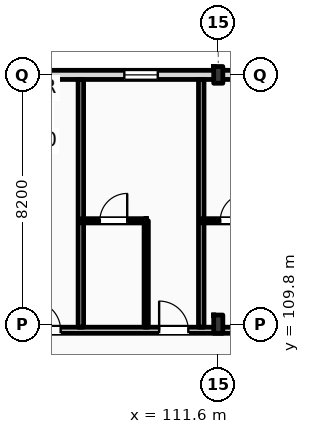
"""IFC4 building model, lengths in metres.
Left out: names, types, materials, properties, quantities, classifications, styles, units other than length and angle.
Written with IfcOpenShell. Run it as: python <this file> out.ifc"""

import sys

from ifc_helpers import new_model, si_unit, direction, frame, frame_2d, origin, origin_2d, place, context, subcontext, project, spatial, rectangle, i_section, extrude, element, fill, save


model = new_model("IFC4")
c1 = context("Model", 3, precision=1e-05, world=origin(), true_north=direction((0.0, 1.0)))
c2 = subcontext(c1, "Body", "Model", "MODEL_VIEW")
j1 = project(units=[si_unit("LENGTHUNIT", "METRE"), si_unit("PLANEANGLEUNIT", "RADIAN")], contexts=[c1])
p1 = place(None, origin())
s1 = spatial("IfcSite", under=j1, at=p1, CompositionType="ELEMENT")
p2 = place(p1, origin())
s2 = spatial("IfcBuilding", under=s1, at=p2, CompositionType="ELEMENT")
p3 = place(p2, frame((0.0, 0.0, 20.4)))
s3 = spatial("IfcBuildingStorey", under=s2, at=p3, CompositionType="ELEMENT", Elevation=20.4)
p4 = place(p3, frame((111.6, 109.8, 0.0), z_axis=(0.0, 0.0, 1.0), x_axis=(1.0, 0.0, 0.0)))
e1 = element("IfcColumn", 1, at=p4, inside=s3, PredefinedType="COLUMN", context=c2, shape_type="SweptSolid", body=[
    extrude(i_section(OverallWidth=0.3, OverallDepth=0.6, WebThickness=0.015, FlangeThickness=0.03, FilletRadius=0.027, at=origin_2d()), origin(), (0.0, 0.0, 1.0), 4.2),
])
p5 = place(p3, frame((111.6, 118.0, 0.0), z_axis=(0.0, 0.0, 1.0), x_axis=(1.0, 0.0, 0.0)))
e2 = element("IfcColumn", 2, at=p5, inside=s3, PredefinedType="COLUMN", context=c2, shape_type="SweptSolid", body=[
    extrude(i_section(OverallWidth=0.3, OverallDepth=0.55, WebThickness=0.015, FlangeThickness=0.029, FilletRadius=0.027, at=origin_2d()), origin(), (0.0, 0.0, 1.0), 4.2),
])
p6 = place(p3, frame((22.5, 118.0, 0.0), z_axis=(0.0, 0.0, 1.0), x_axis=(1.0, 0.0, 0.0)))
e3 = element("IfcWall", 3, at=p6, inside=s3, PredefinedType="STANDARD", context=c2, shape_type="SweptSolid", body=[
    extrude(rectangle(XDim=97.5, YDim=0.3, at=frame_2d((48.75, 0.0))), origin(), (0.0, 0.0, 1.0), 3.38),
])
p7 = place(p6, frame((0.91, 0.0, 0.9)))
e4 = element("IfcOpeningElement", 4, at=p7, cuts=e3, PredefinedType="OPENING", context=c2, shape_type="SweptSolid", body=[
    extrude(rectangle(XDim=0.9, YDim=1.8, at=frame_2d((0.45, 0.9))), frame((0.0, 0.16, 0.0), z_axis=(0.0, -1.0, 0.0), x_axis=(1.0, 0.0, 0.0)), (0.0, 0.0, 1.0), 0.32),
])
p8 = place(p6, frame((6.36, 0.0, 0.0)))
e5 = element("IfcOpeningElement", 5, at=p8, cuts=e3, PredefinedType="OPENING", context=c2, shape_type="SweptSolid", body=[
    extrude(rectangle(XDim=1.2, YDim=2.25, at=frame_2d((0.6, 1.125))), frame((0.0, 0.16, 0.0), z_axis=(0.0, -1.0, 0.0), x_axis=(1.0, 0.0, 0.0)), (0.0, 0.0, 1.0), 0.32),
])
p9 = place(p6, frame((11.41, 0.0, 0.9)))
e6 = element("IfcOpeningElement", 6, at=p9, cuts=e3, PredefinedType="OPENING", context=c2, shape_type="SweptSolid", body=[
    extrude(rectangle(XDim=1.1, YDim=1.9, at=frame_2d((0.55, 0.95))), frame((0.0, 0.16, 0.0), z_axis=(0.0, -1.0, 0.0), x_axis=(1.0, 0.0, 0.0)), (0.0, 0.0, 1.0), 0.32),
])
p10 = place(p6, frame((14.335, 0.0, 0.9)))
e7 = element("IfcOpeningElement", 7, at=p10, cuts=e3, PredefinedType="OPENING", context=c2, shape_type="SweptSolid", body=[
    extrude(rectangle(XDim=1.65, YDim=1.95, at=frame_2d((0.825, 0.975))), frame((0.0, 0.16, 0.0), z_axis=(0.0, -1.0, 0.0), x_axis=(1.0, 0.0, 0.0)), (0.0, 0.0, 1.0), 0.32),
])
p11 = place(p6, frame((19.26, 0.0, 0.9)))
e8 = element("IfcOpeningElement", 8, at=p11, cuts=e3, PredefinedType="OPENING", context=c2, shape_type="SweptSolid", body=[
    extrude(rectangle(XDim=1.35, YDim=2.0, at=frame_2d((0.675, 1.0))), frame((0.0, 0.16, 0.0), z_axis=(0.0, -1.0, 0.0), x_axis=(1.0, 0.0, 0.0)), (0.0, 0.0, 1.0), 0.32),
])
p12 = place(p6, frame((22.8, 0.0, 0.0)))
e9 = element("IfcOpeningElement", 9, at=p12, cuts=e3, PredefinedType="OPENING", context=c2, shape_type="SweptSolid", body=[
    extrude(rectangle(XDim=1.2, YDim=2.25, at=frame_2d((0.6, 1.125))), frame((0.0, 0.16, 0.0), z_axis=(0.0, -1.0, 0.0), x_axis=(1.0, 0.0, 0.0)), (0.0, 0.0, 1.0), 0.32),
])
p13 = place(p6, frame((26.91, 0.0, 0.9)))
e10 = element("IfcOpeningElement", 10, at=p13, cuts=e3, PredefinedType="OPENING", context=c2, shape_type="SweptSolid", body=[
    extrude(rectangle(XDim=2.1, YDim=2.1, at=frame_2d((1.05, 1.05))), frame((0.0, 0.16, 0.0), z_axis=(0.0, -1.0, 0.0), x_axis=(1.0, 0.0, 0.0)), (0.0, 0.0, 1.0), 0.32),
])
p14 = place(p6, frame((30.835, 0.0, 0.9)))
e11 = element("IfcOpeningElement", 11, at=p14, cuts=e3, PredefinedType="OPENING", context=c2, shape_type="SweptSolid", body=[
    extrude(rectangle(XDim=2.25, YDim=2.15, at=frame_2d((1.125, 1.075))), frame((0.0, 0.16, 0.0), z_axis=(0.0, -1.0, 0.0), x_axis=(1.0, 0.0, 0.0)), (0.0, 0.0, 1.0), 0.32),
])
p15 = place(p6, frame((34.96, 0.0, 0.9)))
e12 = element("IfcOpeningElement", 12, at=p15, cuts=e3, PredefinedType="OPENING", context=c2, shape_type="SweptSolid", body=[
    extrude(rectangle(XDim=2.4, YDim=2.2, at=frame_2d((1.2, 1.1))), frame((0.0, 0.16, 0.0), z_axis=(0.0, -1.0, 0.0), x_axis=(1.0, 0.0, 0.0)), (0.0, 0.0, 1.0), 0.32),
])
p16 = place(p6, frame((39.0, 0.0, 0.0)))
e13 = element("IfcOpeningElement", 13, at=p16, cuts=e3, PredefinedType="OPENING", context=c2, shape_type="SweptSolid", body=[
    extrude(rectangle(XDim=1.2, YDim=2.25, at=frame_2d((0.6, 1.125))), frame((0.0, 0.16, 0.0), z_axis=(0.0, -1.0, 0.0), x_axis=(1.0, 0.0, 0.0)), (0.0, 0.0, 1.0), 0.32),
])
p17 = place(p6, frame((43.21, 0.0, 0.9)))
e14 = element("IfcOpeningElement", 14, at=p17, cuts=e3, PredefinedType="OPENING", context=c2, shape_type="SweptSolid", body=[
    extrude(rectangle(XDim=2.7, YDim=2.3, at=frame_2d((1.35, 1.15))), frame((0.0, 0.16, 0.0), z_axis=(0.0, -1.0, 0.0), x_axis=(1.0, 0.0, 0.0)), (0.0, 0.0, 1.0), 0.32),
])
p18 = place(p6, frame((47.335, 0.0, 0.9)))
e15 = element("IfcOpeningElement", 15, at=p18, cuts=e3, PredefinedType="OPENING", context=c2, shape_type="SweptSolid", body=[
    extrude(rectangle(XDim=1.35, YDim=2.3, at=frame_2d((0.675, 1.15))), frame((0.0, 0.16, 0.0), z_axis=(0.0, -1.0, 0.0), x_axis=(1.0, 0.0, 0.0)), (0.0, 0.0, 1.0), 0.32),
])
p19 = place(p6, frame((52.74, 0.0, 0.0)))
e16 = element("IfcOpeningElement", 16, at=p19, cuts=e3, PredefinedType="OPENING", context=c2, shape_type="SweptSolid", body=[
    extrude(rectangle(XDim=1.2, YDim=2.25, at=frame_2d((0.6, 1.125))), frame((0.0, 0.16, 0.0), z_axis=(0.0, -1.0, 0.0), x_axis=(1.0, 0.0, 0.0)), (0.0, 0.0, 1.0), 0.32),
])
p20 = place(p6, frame((55.36, 0.0, 0.9)))
e17 = element("IfcOpeningElement", 17, at=p20, cuts=e3, PredefinedType="OPENING", context=c2, shape_type="SweptSolid", body=[
    extrude(rectangle(XDim=1.1, YDim=2.3, at=frame_2d((0.55, 1.15))), frame((0.0, 0.16, 0.0), z_axis=(0.0, -1.0, 0.0), x_axis=(1.0, 0.0, 0.0)), (0.0, 0.0, 1.0), 0.32),
])
p21 = place(p6, frame((59.99, 0.0, 0.9)))
e18 = element("IfcOpeningElement", 18, at=p21, cuts=e3, PredefinedType="OPENING", context=c2, shape_type="SweptSolid", body=[
    extrude(rectangle(XDim=2.74, YDim=2.3, at=frame_2d((1.37, 1.15))), frame((0.0, 0.16, 0.0), z_axis=(0.0, -1.0, 0.0), x_axis=(1.0, 0.0, 0.0)), (0.0, 0.0, 1.0), 0.32),
])
p22 = place(p6, frame((65.95, 0.0, 0.9)))
e19 = element("IfcOpeningElement", 19, at=p22, cuts=e3, PredefinedType="OPENING", context=c2, shape_type="SweptSolid", body=[
    extrude(rectangle(XDim=1.35, YDim=2.3, at=frame_2d((0.675, 1.15))), frame((0.0, 0.16, 0.0), z_axis=(0.0, -1.0, 0.0), x_axis=(1.0, 0.0, 0.0)), (0.0, 0.0, 1.0), 0.32),
])
p23 = place(p6, frame((69.16, 0.0, 0.0)))
e20 = element("IfcOpeningElement", 20, at=p23, cuts=e3, PredefinedType="OPENING", context=c2, shape_type="SweptSolid", body=[
    extrude(rectangle(XDim=1.2, YDim=2.25, at=frame_2d((0.6, 1.125))), frame((0.0, 0.16, 0.0), z_axis=(0.0, -1.0, 0.0), x_axis=(1.0, 0.0, 0.0)), (0.0, 0.0, 1.0), 0.32),
])
p24 = place(p6, frame((73.75, 0.0, 0.9)))
e21 = element("IfcOpeningElement", 21, at=p24, cuts=e3, PredefinedType="OPENING", context=c2, shape_type="SweptSolid", body=[
    extrude(rectangle(XDim=1.8, YDim=2.3, at=frame_2d((0.9, 1.15))), frame((0.0, 0.16, 0.0), z_axis=(0.0, -1.0, 0.0), x_axis=(1.0, 0.0, 0.0)), (0.0, 0.0, 1.0), 0.32),
])
p25 = place(p6, frame((76.79, 0.0, 0.9)))
e22 = element("IfcOpeningElement", 22, at=p25, cuts=e3, PredefinedType="OPENING", context=c2, shape_type="SweptSolid", body=[
    extrude(rectangle(XDim=2.74, YDim=2.3, at=frame_2d((1.37, 1.15))), frame((0.0, 0.16, 0.0), z_axis=(0.0, -1.0, 0.0), x_axis=(1.0, 0.0, 0.0)), (0.0, 0.0, 1.0), 0.32),
])
p26 = place(p6, frame((81.55, 0.0, 0.9)))
e23 = element("IfcOpeningElement", 23, at=p26, cuts=e3, PredefinedType="OPENING", context=c2, shape_type="SweptSolid", body=[
    extrude(rectangle(XDim=1.8, YDim=2.3, at=frame_2d((0.9, 1.15))), frame((0.0, 0.16, 0.0), z_axis=(0.0, -1.0, 0.0), x_axis=(1.0, 0.0, 0.0)), (0.0, 0.0, 1.0), 0.32),
])
p27 = place(p6, frame((86.01, 0.0, 0.9)))
e24 = element("IfcOpeningElement", 24, at=p27, cuts=e3, PredefinedType="OPENING", context=c2, shape_type="SweptSolid", body=[
    extrude(rectangle(XDim=1.1, YDim=1.5, at=frame_2d((0.55, 0.75))), frame((0.0, 0.16, 0.0), z_axis=(0.0, -1.0, 0.0), x_axis=(1.0, 0.0, 0.0)), (0.0, 0.0, 1.0), 0.32),
])
p28 = place(p6, frame((90.135, 0.0, 0.9)))
e25 = element("IfcOpeningElement", 25, at=p28, cuts=e3, PredefinedType="OPENING", context=c2, shape_type="SweptSolid", body=[
    extrude(rectangle(XDim=1.25, YDim=1.6, at=frame_2d((0.625, 0.8))), frame((0.0, 0.16, 0.0), z_axis=(0.0, -1.0, 0.0), x_axis=(1.0, 0.0, 0.0)), (0.0, 0.0, 1.0), 0.32),
])
p29 = place(p6, frame((94.34, 0.0, 0.9)))
e26 = element("IfcOpeningElement", 26, at=p29, cuts=e3, PredefinedType="OPENING", context=c2, shape_type="SweptSolid", body=[
    extrude(rectangle(XDim=1.4, YDim=1.7, at=frame_2d((0.7, 0.85))), frame((0.0, 0.16, 0.0), z_axis=(0.0, -1.0, 0.0), x_axis=(1.0, 0.0, 0.0)), (0.0, 0.0, 1.0), 0.32),
])
p30 = place(p3, frame((10.65, 109.6, 0.0), z_axis=(0.0, 0.0, 1.0), x_axis=(1.0, 0.0, 0.0)))
e27 = element("IfcWall", 27, at=p30, inside=s3, PredefinedType="PARTITIONING", context=c2, shape_type="SweptSolid", body=[
    extrude(rectangle(XDim=109.21, YDim=0.2, at=frame_2d((54.605, 0.0))), origin(), (0.0, 0.0, 1.0), 3.38),
])
p31 = place(p30, frame((12.535, 0.0, 0.0)))
e28 = element("IfcOpeningElement", 28, at=p31, cuts=e27, PredefinedType="OPENING", context=c2, shape_type="SweptSolid", body=[
    extrude(rectangle(XDim=1.02, YDim=2.2, at=frame_2d((0.51, 1.1))), frame((0.0, 0.11, 0.0), z_axis=(0.0, -1.0, 0.0), x_axis=(1.0, 0.0, 0.0)), (0.0, 0.0, 1.0), 0.22),
])
p32 = place(p30, frame((19.175, 0.0, 0.0)))
e29 = element("IfcOpeningElement", 29, at=p32, cuts=e27, PredefinedType="OPENING", context=c2, shape_type="SweptSolid", body=[
    extrude(rectangle(XDim=1.02, YDim=2.2, at=frame_2d((0.51, 1.1))), frame((0.0, 0.11, 0.0), z_axis=(0.0, -1.0, 0.0), x_axis=(1.0, 0.0, 0.0)), (0.0, 0.0, 1.0), 0.22),
])
p33 = place(p30, frame((23.375, 0.0, 0.0)))
e30 = element("IfcOpeningElement", 30, at=p33, cuts=e27, PredefinedType="OPENING", context=c2, shape_type="SweptSolid", body=[
    extrude(rectangle(XDim=1.02, YDim=2.2, at=frame_2d((0.51, 1.1))), frame((0.0, 0.11, 0.0), z_axis=(0.0, -1.0, 0.0), x_axis=(1.0, 0.0, 0.0)), (0.0, 0.0, 1.0), 0.22),
])
p34 = place(p30, frame((27.575, 0.0, 0.0)))
e31 = element("IfcOpeningElement", 31, at=p34, cuts=e27, PredefinedType="OPENING", context=c2, shape_type="SweptSolid", body=[
    extrude(rectangle(XDim=1.02, YDim=2.2, at=frame_2d((0.51, 1.1))), frame((0.0, 0.11, 0.0), z_axis=(0.0, -1.0, 0.0), x_axis=(1.0, 0.0, 0.0)), (0.0, 0.0, 1.0), 0.22),
])
p35 = place(p30, frame((31.805, 0.0, 0.0)))
e32 = element("IfcOpeningElement", 32, at=p35, cuts=e27, PredefinedType="OPENING", context=c2, shape_type="SweptSolid", body=[
    extrude(rectangle(XDim=0.96, YDim=2.2, at=frame_2d((0.48, 1.1))), frame((0.0, 0.11, 0.0), z_axis=(0.0, -1.0, 0.0), x_axis=(1.0, 0.0, 0.0)), (0.0, 0.0, 1.0), 0.22),
])
p36 = place(p30, frame((33.855, 0.0, 0.0)))
e33 = element("IfcOpeningElement", 33, at=p36, cuts=e27, PredefinedType="OPENING", context=c2, shape_type="SweptSolid", body=[
    extrude(rectangle(XDim=0.96, YDim=2.2, at=frame_2d((0.48, 1.1))), frame((0.0, 0.11, 0.0), z_axis=(0.0, -1.0, 0.0), x_axis=(1.0, 0.0, 0.0)), (0.0, 0.0, 1.0), 0.22),
])
p37 = place(p30, frame((40.205, 0.0, 0.0)))
e34 = element("IfcOpeningElement", 34, at=p37, cuts=e27, PredefinedType="OPENING", context=c2, shape_type="SweptSolid", body=[
    extrude(rectangle(XDim=0.96, YDim=2.2, at=frame_2d((0.48, 1.1))), frame((0.0, 0.11, 0.0), z_axis=(0.0, -1.0, 0.0), x_axis=(1.0, 0.0, 0.0)), (0.0, 0.0, 1.0), 0.22),
])
p38 = place(p30, frame((42.255, 0.0, 0.0)))
e35 = element("IfcOpeningElement", 35, at=p38, cuts=e27, PredefinedType="OPENING", context=c2, shape_type="SweptSolid", body=[
    extrude(rectangle(XDim=0.96, YDim=2.2, at=frame_2d((0.48, 1.1))), frame((0.0, 0.11, 0.0), z_axis=(0.0, -1.0, 0.0), x_axis=(1.0, 0.0, 0.0)), (0.0, 0.0, 1.0), 0.22),
])
p39 = place(p30, frame((48.605, 0.0, 0.0)))
e36 = element("IfcOpeningElement", 36, at=p39, cuts=e27, PredefinedType="OPENING", context=c2, shape_type="SweptSolid", body=[
    extrude(rectangle(XDim=0.96, YDim=2.2, at=frame_2d((0.48, 1.1))), frame((0.0, 0.11, 0.0), z_axis=(0.0, -1.0, 0.0), x_axis=(1.0, 0.0, 0.0)), (0.0, 0.0, 1.0), 0.22),
])
p40 = place(p30, frame((50.655, 0.0, 0.0)))
e37 = element("IfcOpeningElement", 37, at=p40, cuts=e27, PredefinedType="OPENING", context=c2, shape_type="SweptSolid", body=[
    extrude(rectangle(XDim=0.96, YDim=2.2, at=frame_2d((0.48, 1.1))), frame((0.0, 0.11, 0.0), z_axis=(0.0, -1.0, 0.0), x_axis=(1.0, 0.0, 0.0)), (0.0, 0.0, 1.0), 0.22),
])
p41 = place(p30, frame((57.005, 0.0, 0.0)))
e38 = element("IfcOpeningElement", 38, at=p41, cuts=e27, PredefinedType="OPENING", context=c2, shape_type="SweptSolid", body=[
    extrude(rectangle(XDim=0.96, YDim=2.2, at=frame_2d((0.48, 1.1))), frame((0.0, 0.11, 0.0), z_axis=(0.0, -1.0, 0.0), x_axis=(1.0, 0.0, 0.0)), (0.0, 0.0, 1.0), 0.22),
])
p42 = place(p30, frame((59.055, 0.0, 0.0)))
e39 = element("IfcOpeningElement", 39, at=p42, cuts=e27, PredefinedType="OPENING", context=c2, shape_type="SweptSolid", body=[
    extrude(rectangle(XDim=0.96, YDim=2.2, at=frame_2d((0.48, 1.1))), frame((0.0, 0.11, 0.0), z_axis=(0.0, -1.0, 0.0), x_axis=(1.0, 0.0, 0.0)), (0.0, 0.0, 1.0), 0.22),
])
p43 = place(p30, frame((65.405, 0.0, 0.0)))
e40 = element("IfcOpeningElement", 40, at=p43, cuts=e27, PredefinedType="OPENING", context=c2, shape_type="SweptSolid", body=[
    extrude(rectangle(XDim=0.96, YDim=2.2, at=frame_2d((0.48, 1.1))), frame((0.0, 0.11, 0.0), z_axis=(0.0, -1.0, 0.0), x_axis=(1.0, 0.0, 0.0)), (0.0, 0.0, 1.0), 0.22),
])
p44 = place(p30, frame((67.205, 0.0, 0.0)))
e41 = element("IfcOpeningElement", 41, at=p44, cuts=e27, PredefinedType="OPENING", context=c2, shape_type="SweptSolid", body=[
    extrude(rectangle(XDim=0.96, YDim=2.2, at=frame_2d((0.48, 1.1))), frame((0.0, 0.11, 0.0), z_axis=(0.0, -1.0, 0.0), x_axis=(1.0, 0.0, 0.0)), (0.0, 0.0, 1.0), 0.22),
])
p45 = place(p30, frame((73.805, 0.0, 0.0)))
e42 = element("IfcOpeningElement", 42, at=p45, cuts=e27, PredefinedType="OPENING", context=c2, shape_type="SweptSolid", body=[
    extrude(rectangle(XDim=0.96, YDim=2.2, at=frame_2d((0.48, 1.1))), frame((0.0, 0.11, 0.0), z_axis=(0.0, -1.0, 0.0), x_axis=(1.0, 0.0, 0.0)), (0.0, 0.0, 1.0), 0.22),
])
p46 = place(p30, frame((78.255, 0.0, 0.0)))
e43 = element("IfcOpeningElement", 43, at=p46, cuts=e27, PredefinedType="OPENING", context=c2, shape_type="SweptSolid", body=[
    extrude(rectangle(XDim=0.96, YDim=2.2, at=frame_2d((0.48, 1.1))), frame((0.0, 0.11, 0.0), z_axis=(0.0, -1.0, 0.0), x_axis=(1.0, 0.0, 0.0)), (0.0, 0.0, 1.0), 0.22),
])
p47 = place(p30, frame((82.205, 0.0, 0.0)))
e44 = element("IfcOpeningElement", 44, at=p47, cuts=e27, PredefinedType="OPENING", context=c2, shape_type="SweptSolid", body=[
    extrude(rectangle(XDim=0.96, YDim=2.2, at=frame_2d((0.48, 1.1))), frame((0.0, 0.11, 0.0), z_axis=(0.0, -1.0, 0.0), x_axis=(1.0, 0.0, 0.0)), (0.0, 0.0, 1.0), 0.22),
])
p48 = place(p30, frame((86.405, 0.0, 0.0)))
e45 = element("IfcOpeningElement", 45, at=p48, cuts=e27, PredefinedType="OPENING", context=c2, shape_type="SweptSolid", body=[
    extrude(rectangle(XDim=0.96, YDim=2.2, at=frame_2d((0.48, 1.1))), frame((0.0, 0.11, 0.0), z_axis=(0.0, -1.0, 0.0), x_axis=(1.0, 0.0, 0.0)), (0.0, 0.0, 1.0), 0.22),
])
p49 = place(p30, frame((90.605, 0.0, 0.0)))
e46 = element("IfcOpeningElement", 46, at=p49, cuts=e27, PredefinedType="OPENING", context=c2, shape_type="SweptSolid", body=[
    extrude(rectangle(XDim=0.96, YDim=2.2, at=frame_2d((0.48, 1.1))), frame((0.0, 0.11, 0.0), z_axis=(0.0, -1.0, 0.0), x_axis=(1.0, 0.0, 0.0)), (0.0, 0.0, 1.0), 0.22),
])
p50 = place(p30, frame((94.805, 0.0, 0.0)))
e47 = element("IfcOpeningElement", 47, at=p50, cuts=e27, PredefinedType="OPENING", context=c2, shape_type="SweptSolid", body=[
    extrude(rectangle(XDim=0.96, YDim=2.2, at=frame_2d((0.48, 1.1))), frame((0.0, 0.11, 0.0), z_axis=(0.0, -1.0, 0.0), x_axis=(1.0, 0.0, 0.0)), (0.0, 0.0, 1.0), 0.22),
])
p51 = place(p30, frame((99.005, 0.0, 0.0)))
e48 = element("IfcOpeningElement", 48, at=p51, cuts=e27, PredefinedType="OPENING", context=c2, shape_type="SweptSolid", body=[
    extrude(rectangle(XDim=0.96, YDim=2.2, at=frame_2d((0.48, 1.1))), frame((0.0, 0.11, 0.0), z_axis=(0.0, -1.0, 0.0), x_axis=(1.0, 0.0, 0.0)), (0.0, 0.0, 1.0), 0.22),
])
p52 = place(p30, frame((103.205, 0.0, 0.0)))
e49 = element("IfcOpeningElement", 49, at=p52, cuts=e27, PredefinedType="OPENING", context=c2, shape_type="SweptSolid", body=[
    extrude(rectangle(XDim=0.96, YDim=2.2, at=frame_2d((0.48, 1.1))), frame((0.0, 0.11, 0.0), z_axis=(0.0, -1.0, 0.0), x_axis=(1.0, 0.0, 0.0)), (0.0, 0.0, 1.0), 0.22),
])
p53 = place(p30, frame((105.335, 0.0, 0.0)))
e50 = element("IfcOpeningElement", 50, at=p53, cuts=e27, PredefinedType="OPENING", context=c2, shape_type="SweptSolid", body=[
    extrude(rectangle(XDim=0.96, YDim=2.2, at=frame_2d((0.48, 1.1))), frame((0.0, 0.11, 0.0), z_axis=(0.0, -1.0, 0.0), x_axis=(1.0, 0.0, 0.0)), (0.0, 0.0, 1.0), 0.22),
])
p54 = place(p30, frame((2.716, 0.0, 0.0)))
e51 = element("IfcOpeningElement", 51, at=p54, cuts=e27, PredefinedType="OPENING", context=c2, shape_type="SweptSolid", body=[
    extrude(rectangle(XDim=1.35, YDim=2.25, at=frame_2d((0.675, 1.125))), frame((0.0, 0.11, 0.0), z_axis=(0.0, -1.0, 0.0), x_axis=(1.0, 0.0, 0.0)), (0.0, 0.0, 1.0), 0.22),
])
p55 = place(p30, frame((6.65, 0.0, 0.0)))
e52 = element("IfcOpeningElement", 52, at=p55, cuts=e27, PredefinedType="OPENING", context=c2, shape_type="SweptSolid", body=[
    extrude(rectangle(XDim=1.35, YDim=2.25, at=frame_2d((0.675, 1.125))), frame((0.0, 0.11, 0.0), z_axis=(0.0, -1.0, 0.0), x_axis=(1.0, 0.0, 0.0)), (0.0, 0.0, 1.0), 0.22),
])
p56 = place(p30, frame((10.583, 0.0, 0.0)))
e53 = element("IfcOpeningElement", 53, at=p56, cuts=e27, PredefinedType="OPENING", context=c2, shape_type="SweptSolid", body=[
    extrude(rectangle(XDim=1.35, YDim=2.25, at=frame_2d((0.675, 1.125))), frame((0.0, 0.11, 0.0), z_axis=(0.0, -1.0, 0.0), x_axis=(1.0, 0.0, 0.0)), (0.0, 0.0, 1.0), 0.22),
])
for number, where, z_axis, x_axis in (
    (54, (107.08, 109.7, 0.0), (0.0, 0.0, 1.0), (0.0, 1.0, 0.0)),
    (55, (111.04, 109.7, 0.0), (0.0, 0.0, 1.0), (0.0, 1.0, 0.0)),
):
    element("IfcWall", number, at=place(p3, frame(where, z_axis=z_axis, x_axis=x_axis)), inside=s3, PredefinedType="PARTITIONING", context=c2, shape_type="SweptSolid", body=[
        extrude(rectangle(XDim=8.15, YDim=0.18, at=frame_2d((4.075, 0.0))), origin(), (0.0, 0.0, 1.0), 3.94),
    ])
p57 = place(p3, frame((109.23, 109.7, 0.0), z_axis=(0.0, 0.0, 1.0), x_axis=(0.0, 1.0, 0.0)))
e56 = element("IfcWall", 56, at=p57, inside=s3, PredefinedType="PARTITIONING", context=c2, shape_type="SweptSolid", body=[
    extrude(rectangle(XDim=3.5, YDim=0.14, at=frame_2d((1.75, 0.0))), origin(), (0.0, 0.0, 1.0), 3.94),
])
p58 = place(p3, frame((107.08, 113.2, 0.0), z_axis=(0.0, 0.0, 1.0), x_axis=(1.0, 0.0, 0.0)))
e57 = element("IfcWall", 57, at=p58, inside=s3, PredefinedType="PARTITIONING", context=c2, shape_type="SweptSolid", body=[
    extrude(rectangle(XDim=2.15, YDim=0.14, at=frame_2d((1.075, 0.0))), origin(), (0.0, 0.0, 1.0), 3.94),
])
p59 = place(p58, frame((0.625, 0.0, 0.0)))
e58 = element("IfcOpeningElement", 58, at=p59, cuts=e57, PredefinedType="OPENING", context=c2, shape_type="SweptSolid", body=[
    extrude(rectangle(XDim=0.9, YDim=2.1, at=frame_2d((0.45, 1.05))), frame((0.0, 0.08, 0.0), z_axis=(0.0, -1.0, 0.0), x_axis=(1.0, 0.0, 0.0)), (0.0, 0.0, 1.0), 0.16),
])
p60 = place(p3, frame((111.04, 113.2, 0.0), z_axis=(0.0, 0.0, 1.0), x_axis=(1.0, 0.0, 0.0)))
e59 = element("IfcWall", 59, at=p60, inside=s3, PredefinedType="PARTITIONING", context=c2, shape_type="SweptSolid", body=[
    extrude(rectangle(XDim=2.15, YDim=0.14, at=frame_2d((1.075, 0.0))), origin(), (0.0, 0.0, 1.0), 3.94),
])
p61 = place(p60, frame((0.625, 0.0, 0.0)))
e60 = element("IfcOpeningElement", 60, at=p61, cuts=e59, PredefinedType="OPENING", context=c2, shape_type="SweptSolid", body=[
    extrude(rectangle(XDim=0.9, YDim=2.1, at=frame_2d((0.45, 1.05))), frame((0.0, 0.08, 0.0), z_axis=(0.0, -1.0, 0.0), x_axis=(1.0, 0.0, 0.0)), (0.0, 0.0, 1.0), 0.16),
])
p62 = place(p27, origin())
e61 = element("IfcWindow", 61, at=p62, inside=s3, PartitioningType="DOUBLE_PANEL_VERTICAL", PredefinedType="WINDOW", context=c2, shape_type="SweptSolid", body=[
    extrude(rectangle(XDim=1.1, YDim=1.5, at=frame_2d((0.55, 0.75))), frame((0.0, 0.03, 0.0), z_axis=(0.0, -1.0, 0.0), x_axis=(1.0, 0.0, 0.0)), (0.0, 0.0, 1.0), 0.06),
])
fill(e24, e61)
p63 = place(p50, origin())
e62 = element("IfcDoor", 62, at=p63, inside=s3, OperationType="SINGLE_SWING_LEFT", PredefinedType="DOOR", context=c2, shape_type="SweptSolid", body=[
    extrude(rectangle(XDim=0.96, YDim=2.2, at=frame_2d((0.48, 1.1))), frame((0.0, 0.025, 0.0), z_axis=(0.0, -1.0, 0.0), x_axis=(1.0, 0.0, 0.0)), (0.0, 0.0, 1.0), 0.05),
])
fill(e47, e62)
p64 = place(p51, origin())
e63 = element("IfcDoor", 63, at=p64, inside=s3, OperationType="SINGLE_SWING_LEFT", PredefinedType="DOOR", context=c2, shape_type="SweptSolid", body=[
    extrude(rectangle(XDim=0.96, YDim=2.2, at=frame_2d((0.48, 1.1))), frame((0.0, 0.025, 0.0), z_axis=(0.0, -1.0, 0.0), x_axis=(1.0, 0.0, 0.0)), (0.0, 0.0, 1.0), 0.05),
])
fill(e48, e63)
p65 = place(p59, origin())
e64 = element("IfcDoor", 64, at=p65, inside=s3, OperationType="SINGLE_SWING_RIGHT", PredefinedType="DOOR", context=c2, shape_type="SweptSolid", body=[
    extrude(rectangle(XDim=0.9, YDim=2.1, at=frame_2d((0.45, 1.05))), frame((0.0, 0.025, 0.0), z_axis=(0.0, -1.0, 0.0), x_axis=(1.0, 0.0, 0.0)), (0.0, 0.0, 1.0), 0.05),
])
fill(e58, e64)
p66 = place(p61, origin())
e65 = element("IfcDoor", 65, at=p66, inside=s3, OperationType="SINGLE_SWING_RIGHT", PredefinedType="DOOR", context=c2, shape_type="SweptSolid", body=[
    extrude(rectangle(XDim=0.9, YDim=2.1, at=frame_2d((0.45, 1.05))), frame((0.0, 0.025, 0.0), z_axis=(0.0, -1.0, 0.0), x_axis=(1.0, 0.0, 0.0)), (0.0, 0.0, 1.0), 0.05),
])
fill(e60, e65)
save(model, sys.argv[1])
